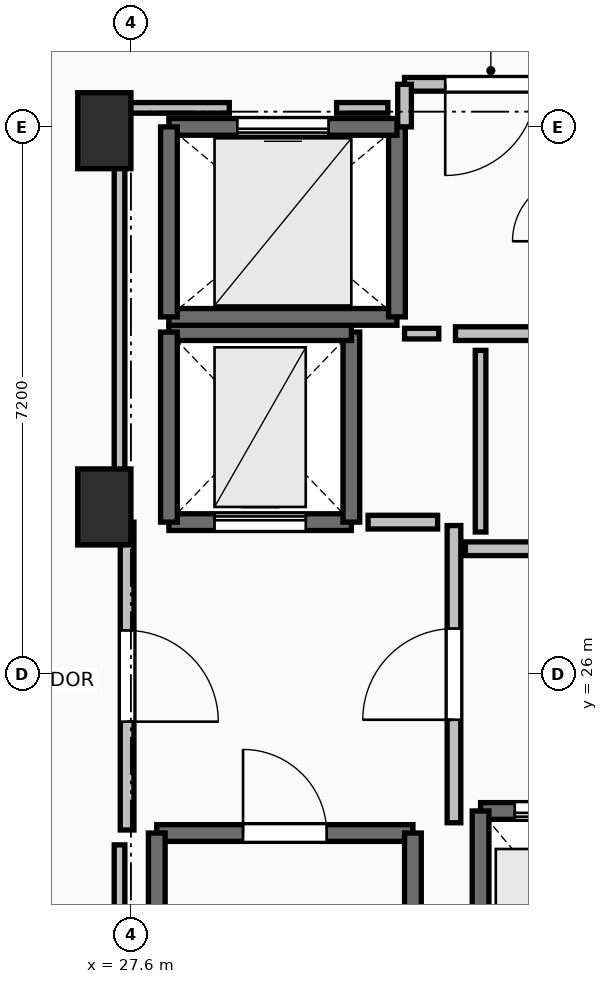
"""IFC4 building model, lengths in metres.
Left out: names, types, materials, properties, quantities, classifications, styles, units other than length and angle.
Written with IfcOpenShell. Run it as: python <this file> out.ifc"""

import sys

from ifc_helpers import new_model, si_unit, direction, frame, frame_2d, origin, origin_2d, place, context, subcontext, project, spatial, rectangle, extrude, element, fill, save


model = new_model("IFC4")
c1 = context("Model", 3, precision=1e-05, world=origin(), true_north=direction((0.0, 1.0)))
c2 = subcontext(c1, "Body", "Model", "MODEL_VIEW")
j1 = project(units=[si_unit("LENGTHUNIT", "METRE"), si_unit("PLANEANGLEUNIT", "RADIAN")], contexts=[c1])
p1 = place(None, origin())
s1 = spatial("IfcSite", under=j1, at=p1, CompositionType="ELEMENT")
p2 = place(p1, origin())
s2 = spatial("IfcBuilding", under=s1, at=p2, CompositionType="ELEMENT")
p3 = place(p2, frame((0.0, 0.0, 196.6)))
s3 = spatial("IfcBuildingStorey", under=s2, at=p3, CompositionType="ELEMENT", Elevation=196.6)
for number, where, z_axis, x_axis in (
    (1, (27.25, 28.2, 0.0), (0.0, 0.0, 1.0), (1.0, 0.0, 0.0)),
    (2, (27.25, 33.15, 0.0), (0.0, 0.0, 1.0), (1.0, 0.0, 0.0)),
):
    element("IfcColumn", number, at=place(p3, frame(where, z_axis=z_axis, x_axis=x_axis)), inside=s3, PredefinedType="PILASTER", context=c2, shape_type="SweptSolid", body=[
        extrude(rectangle(XDim=0.7, YDim=1.0, at=origin_2d()), origin(), (0.0, 0.0, 1.0), 3.5),
    ])
p4 = place(p3, frame((27.94, 23.91, 0.0), z_axis=(0.0, 0.0, 1.0), x_axis=(1.0, 0.0, 0.0)))
e3 = element("IfcWall", 3, at=p4, inside=s3, PredefinedType="SOLIDWALL", context=c2, shape_type="SweptSolid", body=[
    extrude(rectangle(XDim=3.37, YDim=0.22, at=frame_2d((1.685, 0.0))), origin(), (0.0, 0.0, 1.0), 3.24),
])
p5 = place(p4, frame((1.135, 0.0, 0.0)))
e4 = element("IfcOpeningElement", 4, at=p5, cuts=e3, PredefinedType="OPENING", context=c2, shape_type="SweptSolid", body=[
    extrude(rectangle(XDim=1.1, YDim=2.15, at=frame_2d((0.55, 1.075))), frame((0.0, 0.125, 0.0), z_axis=(0.0, -1.0, 0.0), x_axis=(1.0, 0.0, 0.0)), (0.0, 0.0, 1.0), 0.25),
])
for number, where, z_axis, x_axis in (
    (5, (31.31, 23.91, 0.0), (0.0, 0.0, 1.0), (0.0, -1.0, 0.0)),
    (6, (27.94, 16.49, 0.0), (0.0, 0.0, 1.0), (0.0, 1.0, 0.0)),
):
    element("IfcWall", number, at=place(p3, frame(where, z_axis=z_axis, x_axis=x_axis)), inside=s3, PredefinedType="SOLIDWALL", context=c2, shape_type="SweptSolid", body=[
        extrude(rectangle(XDim=7.42, YDim=0.22, at=frame_2d((3.71, 0.0))), origin(), (0.0, 0.0, 1.0), 3.24),
    ])
p6 = place(p3, frame((34.2, 24.2, 0.0), z_axis=(0.0, 0.0, 1.0), x_axis=(-1.0, 0.0, 0.0)))
e7 = element("IfcWall", 7, at=p6, inside=s3, PredefinedType="SOLIDWALL", context=c2, shape_type="SweptSolid", body=[
    extrude(rectangle(XDim=2.0, YDim=0.22, at=frame_2d((1.0, 0.0))), origin(), (0.0, 0.0, 1.0), 3.24),
])
p7 = place(p6, frame((0.45, 0.0, 0.0)))
e8 = element("IfcOpeningElement", 8, at=p7, cuts=e7, PredefinedType="OPENING", context=c2, shape_type="SweptSolid", body=[
    extrude(rectangle(XDim=1.1, YDim=2.2, at=frame_2d((0.55, 1.1))), frame((0.0, 0.125, 0.0), z_axis=(0.0, -1.0, 0.0), x_axis=(1.0, 0.0, 0.0)), (0.0, 0.0, 1.0), 0.25),
])
p8 = place(p3, frame((32.2, 24.2, 0.0), z_axis=(0.0, 0.0, 1.0), x_axis=(0.0, -1.0, 0.0)))
e9 = element("IfcWall", 9, at=p8, inside=s3, PredefinedType="SOLIDWALL", context=c2, shape_type="SweptSolid", body=[
    extrude(rectangle(XDim=2.4, YDim=0.22, at=frame_2d((1.2, 0.0))), origin(), (0.0, 0.0, 1.0), 3.24),
])
p9 = place(p3, frame((28.1, 28.0, 0.0), z_axis=(0.0, 0.0, 1.0), x_axis=(1.0, 0.0, 0.0)))
e10 = element("IfcWall", 10, at=p9, inside=s3, PredefinedType="SHEAR", context=c2, shape_type="SweptSolid", body=[
    extrude(rectangle(XDim=2.4, YDim=0.22, at=frame_2d((1.2, 0.0))), origin(), (0.0, 0.0, 1.0), 3.24),
])
p10 = place(p9, frame((0.6, 0.0, 0.0)))
e11 = element("IfcOpeningElement", 11, at=p10, cuts=e10, PredefinedType="OPENING", context=c2, shape_type="SweptSolid", body=[
    extrude(rectangle(XDim=1.2, YDim=2.2, at=frame_2d((0.6, 1.1))), frame((0.0, 0.125, 0.0), z_axis=(0.0, -1.0, 0.0), x_axis=(1.0, 0.0, 0.0)), (0.0, 0.0, 1.0), 0.25),
])
p11 = place(p3, frame((30.5, 28.0, 0.0), z_axis=(0.0, 0.0, 1.0), x_axis=(0.0, 1.0, 0.0)))
e12 = element("IfcWall", 12, at=p11, inside=s3, PredefinedType="SHEAR", context=c2, shape_type="SweptSolid", body=[
    extrude(rectangle(XDim=2.5, YDim=0.22, at=frame_2d((1.25, 0.0))), origin(), (0.0, 0.0, 1.0), 3.24),
])
p12 = place(p3, frame((30.5, 30.5, 0.0), z_axis=(0.0, 0.0, 1.0), x_axis=(-1.0, 0.0, 0.0)))
e13 = element("IfcWall", 13, at=p12, inside=s3, PredefinedType="SHEAR", context=c2, shape_type="SweptSolid", body=[
    extrude(rectangle(XDim=2.4, YDim=0.22, at=frame_2d((1.2, 0.0))), origin(), (0.0, 0.0, 1.0), 3.24),
])
p13 = place(p3, frame((28.1, 30.5, 0.0), z_axis=(0.0, 0.0, 1.0), x_axis=(0.0, -1.0, 0.0)))
e14 = element("IfcWall", 14, at=p13, inside=s3, PredefinedType="SHEAR", context=c2, shape_type="SweptSolid", body=[
    extrude(rectangle(XDim=2.5, YDim=0.22, at=frame_2d((1.25, 0.0))), origin(), (0.0, 0.0, 1.0), 3.24),
])
p14 = place(p3, frame((28.1, 30.7, 0.0), z_axis=(0.0, 0.0, 1.0), x_axis=(1.0, 0.0, 0.0)))
e15 = element("IfcWall", 15, at=p14, inside=s3, PredefinedType="SOLIDWALL", context=c2, shape_type="SweptSolid", body=[
    extrude(rectangle(XDim=3.0, YDim=0.22, at=frame_2d((1.5, 0.0))), origin(), (0.0, 0.0, 1.0), 3.24),
])
p15 = place(p3, frame((31.1, 30.7, 0.0), z_axis=(0.0, 0.0, 1.0), x_axis=(0.0, 1.0, 0.0)))
e16 = element("IfcWall", 16, at=p15, inside=s3, PredefinedType="SOLIDWALL", context=c2, shape_type="SweptSolid", body=[
    extrude(rectangle(XDim=2.5, YDim=0.22, at=frame_2d((1.25, 0.0))), origin(), (0.0, 0.0, 1.0), 3.24),
])
p16 = place(p3, frame((31.1, 33.2, 0.0), z_axis=(0.0, 0.0, 1.0), x_axis=(-1.0, 0.0, 0.0)))
e17 = element("IfcWall", 17, at=p16, inside=s3, PredefinedType="SOLIDWALL", context=c2, shape_type="SweptSolid", body=[
    extrude(rectangle(XDim=3.0, YDim=0.22, at=frame_2d((1.5, 0.0))), origin(), (0.0, 0.0, 1.0), 3.24),
])
p17 = place(p16, frame((0.9, 0.0, 0.0)))
e18 = element("IfcOpeningElement", 18, at=p17, cuts=e17, PredefinedType="OPENING", context=c2, shape_type="SweptSolid", body=[
    extrude(rectangle(XDim=1.2, YDim=2.2, at=frame_2d((0.6, 1.1))), frame((0.0, 0.125, 0.0), z_axis=(0.0, -1.0, 0.0), x_axis=(1.0, 0.0, 0.0)), (0.0, 0.0, 1.0), 0.25),
])
p18 = place(p3, frame((28.1, 33.2, 0.0), z_axis=(0.0, 0.0, 1.0), x_axis=(0.0, -1.0, 0.0)))
e19 = element("IfcWall", 19, at=p18, inside=s3, PredefinedType="SOLIDWALL", context=c2, shape_type="SweptSolid", body=[
    extrude(rectangle(XDim=2.5, YDim=0.22, at=frame_2d((1.25, 0.0))), origin(), (0.0, 0.0, 1.0), 3.24),
])
p19 = place(p3, frame((31.85, 24.045, 0.0), z_axis=(0.0, 0.0, 1.0), x_axis=(0.0, 1.0, 0.0)))
e20 = element("IfcWall", 20, at=p19, inside=s3, PredefinedType="PARTITIONING", context=c2, shape_type="SweptSolid", body=[
    extrude(rectangle(XDim=3.91, YDim=0.18, at=frame_2d((1.955, 0.0))), origin(), (0.0, 0.0, 1.0), 3.24),
])
p20 = place(p19, frame((1.355, 0.0, 0.0)))
e21 = element("IfcOpeningElement", 21, at=p20, cuts=e20, PredefinedType="OPENING", context=c2, shape_type="SweptSolid", body=[
    extrude(rectangle(XDim=1.2, YDim=2.15, at=frame_2d((0.6, 1.075))), frame((0.0, 0.105, 0.0), z_axis=(0.0, -1.0, 0.0), x_axis=(1.0, 0.0, 0.0)), (0.0, 0.0, 1.0), 0.21),
])
p21 = place(p3, frame((27.55, 28.0, 0.0), z_axis=(0.0, 0.0, 1.0), x_axis=(0.0, -1.0, 0.0)))
e22 = element("IfcWall", 22, at=p21, inside=s3, PredefinedType="PARTITIONING", context=c2, shape_type="SweptSolid", body=[
    extrude(rectangle(XDim=4.05, YDim=0.18, at=frame_2d((2.025, 0.0))), origin(), (0.0, 0.0, 1.0), 3.24),
])
p22 = place(p21, frame((1.425, 0.0, 0.0)))
e23 = element("IfcOpeningElement", 23, at=p22, cuts=e22, PredefinedType="OPENING", context=c2, shape_type="SweptSolid", body=[
    extrude(rectangle(XDim=1.2, YDim=2.15, at=frame_2d((0.6, 1.075))), frame((0.0, 0.105, 0.0), z_axis=(0.0, -1.0, 0.0), x_axis=(1.0, 0.0, 0.0)), (0.0, 0.0, 1.0), 0.21),
])
p23 = place(p3, frame((31.87, 30.48, 0.0), z_axis=(0.0, 0.0, 1.0), x_axis=(1.0, 0.0, 0.0)))
e24 = element("IfcWall", 24, at=p23, inside=s3, PredefinedType="PARTITIONING", context=c2, shape_type="SweptSolid", body=[
    extrude(rectangle(XDim=1.6, YDim=0.18, at=frame_2d((0.8, 0.0))), origin(), (0.0, 0.0, 1.0), 3.24),
])
p24 = place(p3, frame((33.47, 33.76, 0.0), z_axis=(0.0, 0.0, 1.0), x_axis=(-1.0, 0.0, 0.0)))
e25 = element("IfcWall", 25, at=p24, inside=s3, PredefinedType="PARTITIONING", context=c2, shape_type="SweptSolid", body=[
    extrude(rectangle(XDim=2.27, YDim=0.18, at=frame_2d((1.135, 0.0))), origin(), (0.0, 0.0, 1.0), 3.24),
])
p25 = place(p24, frame((0.535, 0.0, 0.0)))
e26 = element("IfcOpeningElement", 26, at=p25, cuts=e25, PredefinedType="OPENING", context=c2, shape_type="SweptSolid", body=[
    extrude(rectangle(XDim=1.2, YDim=2.15, at=frame_2d((0.6, 1.075))), frame((0.0, 0.105, 0.0), z_axis=(0.0, -1.0, 0.0), x_axis=(1.0, 0.0, 0.0)), (0.0, 0.0, 1.0), 0.21),
])
p26 = place(p3, frame((31.2, 33.76, 0.0), z_axis=(0.0, 0.0, 1.0), x_axis=(0.0, -1.0, 0.0)))
e27 = element("IfcWall", 27, at=p26, inside=s3, PredefinedType="PARTITIONING", context=c2, shape_type="SweptSolid", body=[
    extrude(rectangle(XDim=0.56, YDim=0.18, at=frame_2d((0.28, 0.0))), origin(), (0.0, 0.0, 1.0), 3.24),
])
p27 = place(p3, frame((39.19, 27.65, 0.0), z_axis=(0.0, 0.0, 1.0), x_axis=(-1.0, 0.0, 0.0)))
e28 = element("IfcWall", 28, at=p27, inside=s3, PredefinedType="PARTITIONING", context=c2, shape_type="SweptSolid", body=[
    extrude(rectangle(XDim=7.19, YDim=0.18, at=frame_2d((3.595, 0.0))), origin(), (0.0, 0.0, 1.0), 3.24),
])
p28 = place(p27, frame((3.095, 0.0, 0.0)))
e29 = element("IfcOpeningElement", 29, at=p28, cuts=e28, PredefinedType="OPENING", context=c2, shape_type="SweptSolid", body=[
    extrude(rectangle(XDim=1.0, YDim=2.15, at=frame_2d((0.5, 1.075))), frame((0.0, 0.105, 0.0), z_axis=(0.0, -1.0, 0.0), x_axis=(1.0, 0.0, 0.0)), (0.0, 0.0, 1.0), 0.21),
])
p29 = place(p3, frame((31.635, 28.0, 0.0), z_axis=(0.0, 0.0, 1.0), x_axis=(-1.0, 0.0, 0.0)))
e30 = element("IfcWall", 30, at=p29, inside=s3, PredefinedType="PARTITIONING", context=c2, shape_type="SweptSolid", body=[
    extrude(rectangle(XDim=0.915, YDim=0.18, at=frame_2d((0.458, 0.0))), origin(), (0.0, 0.0, 1.0), 3.24),
])
p30 = place(p3, frame((31.2, 30.48, 0.0), z_axis=(0.0, 0.0, 1.0), x_axis=(1.0, 0.0, 0.0)))
e31 = element("IfcWall", 31, at=p30, inside=s3, PredefinedType="PARTITIONING", context=c2, shape_type="SweptSolid", body=[
    extrude(rectangle(XDim=0.45, YDim=0.14, at=frame_2d((0.225, 0.0))), origin(), (0.0, 0.0, 1.0), 3.24),
])
p31 = place(p3, frame((32.2, 30.26, 0.0), z_axis=(0.0, 0.0, 1.0), x_axis=(0.0, -1.0, 0.0)))
e32 = element("IfcWall", 32, at=p31, inside=s3, PredefinedType="PARTITIONING", context=c2, shape_type="SweptSolid", body=[
    extrude(rectangle(XDim=2.39, YDim=0.14, at=frame_2d((1.195, 0.0))), origin(), (0.0, 0.0, 1.0), 3.24),
])
p32 = place(p3, frame((30.98, 33.45, 0.0), z_axis=(0.0, 0.0, 1.0), x_axis=(-1.0, 0.0, 0.0)))
e33 = element("IfcWall", 33, at=p32, inside=s3, PredefinedType="PARTITIONING", context=c2, shape_type="SweptSolid", body=[
    extrude(rectangle(XDim=0.674, YDim=0.14, at=frame_2d((0.337, 0.0))), origin(), (0.0, 0.0, 1.0), 3.24),
])
p33 = place(p3, frame((28.894, 33.45, 0.0), z_axis=(0.0, 0.0, 1.0), x_axis=(-1.0, 0.0, 0.0)))
e34 = element("IfcWall", 34, at=p33, inside=s3, PredefinedType="PARTITIONING", context=c2, shape_type="SweptSolid", body=[
    extrude(rectangle(XDim=1.444, YDim=0.14, at=frame_2d((0.722, 0.0))), origin(), (0.0, 0.0, 1.0), 2.432),
])
p34 = place(p3, frame((27.45, 33.45, 0.0), z_axis=(0.0, 0.0, 1.0), x_axis=(0.0, -1.0, 0.0)))
e35 = element("IfcWall", 35, at=p34, inside=s3, PredefinedType="PARTITIONING", context=c2, shape_type="SweptSolid", body=[
    extrude(rectangle(XDim=5.254, YDim=0.14, at=frame_2d((2.627, 0.0))), origin(), (0.0, 0.0, 1.0), 2.432),
])
p35 = place(p3, frame((27.45, 23.754, 0.0), z_axis=(0.0, 0.0, 1.0), x_axis=(0.0, -1.0, 0.0)))
e36 = element("IfcWall", 36, at=p35, inside=s3, PredefinedType="PARTITIONING", context=c2, shape_type="SweptSolid", body=[
    extrude(rectangle(XDim=7.514, YDim=0.14, at=frame_2d((3.757, 0.0))), origin(), (0.0, 0.0, 1.0), 2.432),
])
p36 = place(p5, origin())
e37 = element("IfcDoor", 37, at=p36, inside=s3, OperationType="SINGLE_SWING_LEFT", PredefinedType="DOOR", context=c2, shape_type="SweptSolid", body=[
    extrude(rectangle(XDim=1.1, YDim=2.15, at=frame_2d((0.55, 1.075))), frame((0.0, 0.025, 0.0), z_axis=(0.0, -1.0, 0.0), x_axis=(1.0, 0.0, 0.0)), (0.0, 0.0, 1.0), 0.05),
])
fill(e4, e37)
p37 = place(p7, origin())
e38 = element("IfcDoor", 38, at=p37, inside=s3, OperationType="SLIDING_TO_LEFT", PredefinedType="DOOR", context=c2, shape_type="SweptSolid", body=[
    extrude(rectangle(XDim=1.1, YDim=2.2, at=frame_2d((0.55, 1.1))), frame((0.0, 0.025, 0.0), z_axis=(0.0, -1.0, 0.0), x_axis=(1.0, 0.0, 0.0)), (0.0, 0.0, 1.0), 0.05),
])
fill(e8, e38)
p38 = place(p10, origin())
e39 = element("IfcDoor", 39, at=p38, inside=s3, OperationType="SLIDING_TO_LEFT", PredefinedType="DOOR", context=c2, shape_type="SweptSolid", body=[
    extrude(rectangle(XDim=1.2, YDim=2.2, at=frame_2d((0.6, 1.1))), frame((0.0, 0.025, 0.0), z_axis=(0.0, -1.0, 0.0), x_axis=(1.0, 0.0, 0.0)), (0.0, 0.0, 1.0), 0.05),
])
fill(e11, e39)
p39 = place(p17, origin())
e40 = element("IfcDoor", 40, at=p39, inside=s3, OperationType="SLIDING_TO_LEFT", PredefinedType="DOOR", context=c2, shape_type="SweptSolid", body=[
    extrude(rectangle(XDim=1.2, YDim=2.2, at=frame_2d((0.6, 1.1))), frame((0.0, 0.025, 0.0), z_axis=(0.0, -1.0, 0.0), x_axis=(1.0, 0.0, 0.0)), (0.0, 0.0, 1.0), 0.05),
])
fill(e18, e40)
p40 = place(p20, origin())
e41 = element("IfcDoor", 41, at=p40, inside=s3, OperationType="SINGLE_SWING_LEFT", PredefinedType="DOOR", context=c2, shape_type="SweptSolid", body=[
    extrude(rectangle(XDim=1.2, YDim=2.15, at=frame_2d((0.6, 1.075))), frame((0.0, 0.025, 0.0), z_axis=(0.0, -1.0, 0.0), x_axis=(1.0, 0.0, 0.0)), (0.0, 0.0, 1.0), 0.05),
])
fill(e21, e41)
p41 = place(p22, origin())
e42 = element("IfcDoor", 42, at=p41, inside=s3, OperationType="SINGLE_SWING_RIGHT", PredefinedType="DOOR", context=c2, shape_type="SweptSolid", body=[
    extrude(rectangle(XDim=1.2, YDim=2.15, at=frame_2d((0.6, 1.075))), frame((0.0, 0.025, 0.0), z_axis=(0.0, -1.0, 0.0), x_axis=(1.0, 0.0, 0.0)), (0.0, 0.0, 1.0), 0.05),
])
fill(e23, e42)
p42 = place(p25, origin())
e43 = element("IfcDoor", 43, at=p42, inside=s3, OperationType="SINGLE_SWING_RIGHT", PredefinedType="DOOR", context=c2, shape_type="SweptSolid", body=[
    extrude(rectangle(XDim=1.2, YDim=2.15, at=frame_2d((0.6, 1.075))), frame((0.0, 0.025, 0.0), z_axis=(0.0, -1.0, 0.0), x_axis=(1.0, 0.0, 0.0)), (0.0, 0.0, 1.0), 0.05),
])
fill(e26, e43)
save(model, sys.argv[1])
